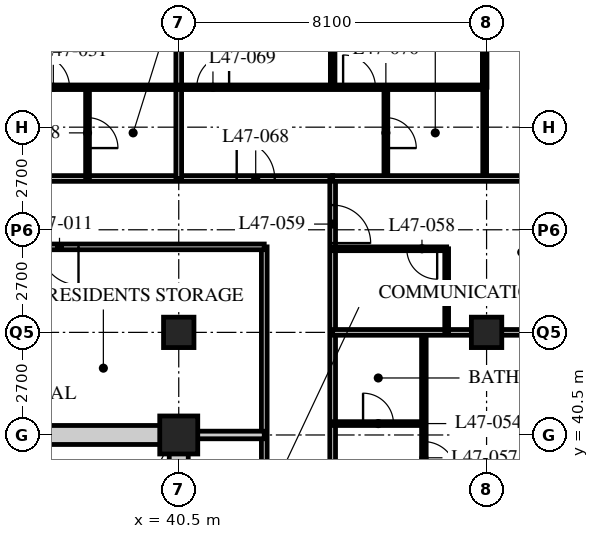
"""IFC4 building model, lengths in metres.
Left out: names, types, materials, properties, quantities, classifications, styles, units other than length and angle.
Written with IfcOpenShell. Run it as: python <this file> out.ifc"""

import sys

from ifc_helpers import new_model, si_unit, direction, frame, frame_2d, origin, origin_2d, place, context, subcontext, project, spatial, rectangle, hollow_rectangle, extrude, element, fill, save


model = new_model("IFC4")
c1 = context("Model", 3, precision=1e-05, world=origin(), true_north=direction((0.0, 1.0)))
c2 = subcontext(c1, "Body", "Model", "MODEL_VIEW")
j1 = project(units=[si_unit("LENGTHUNIT", "METRE"), si_unit("PLANEANGLEUNIT", "RADIAN")], contexts=[c1])
p1 = place(None, origin())
s1 = spatial("IfcSite", under=j1, at=p1, CompositionType="ELEMENT")
p2 = place(p1, origin())
s2 = spatial("IfcBuilding", under=s1, at=p2, CompositionType="ELEMENT")
p3 = place(p2, frame((0.0, 0.0, 184.8)))
s3 = spatial("IfcBuildingStorey", under=s2, at=p3, CompositionType="ELEMENT", Elevation=184.8)
p4 = place(p3, frame((40.5, 40.5, 0.0), z_axis=(0.0, 0.0, 1.0), x_axis=(1.0, 0.0, 0.0)))
e1 = element("IfcColumn", 1, at=p4, inside=s3, PredefinedType="COLUMN", context=c2, shape_type="SweptSolid", body=[
    extrude(hollow_rectangle(XDim=1.0, YDim=1.0, WallThickness=0.1, at=origin_2d()), origin(), (0.0, 0.0, 1.0), 3.6),
])
for number, where, z_axis, x_axis in (
    (2, (40.5, 43.2, 0.0), (0.0, 0.0, 1.0), (1.0, 0.0, 0.0)),
    (3, (48.6, 43.2, 0.0), (0.0, 0.0, 1.0), (1.0, 0.0, 0.0)),
):
    element("IfcColumn", number, at=place(p3, frame(where, z_axis=z_axis, x_axis=x_axis)), inside=s3, PredefinedType="COLUMN", context=c2, shape_type="SweptSolid", body=[
        extrude(hollow_rectangle(XDim=0.8, YDim=0.8, WallThickness=0.08, at=origin_2d()), origin(), (0.0, 0.0, 1.0), 3.6),
    ])
p5 = place(p3, frame((12.15, 47.25, 0.0), z_axis=(0.0, 0.0, 1.0), x_axis=(1.0, 0.0, 0.0)))
e4 = element("IfcWall", 4, at=p5, inside=s3, PredefinedType="PARTITIONING", context=c2, shape_type="SweptSolid", body=[
    extrude(rectangle(XDim=32.4, YDim=0.15, at=frame_2d((16.2, 0.0))), origin(), (0.0, 0.0, 1.0), 3.39),
])
p6 = place(p5, frame((4.45, 0.0, 0.0)))
e5 = element("IfcOpeningElement", 5, at=p6, cuts=e4, PredefinedType="OPENING", context=c2, shape_type="SweptSolid", body=[
    extrude(rectangle(XDim=1.0, YDim=2.1, at=frame_2d((0.5, 1.05))), frame((0.0, 0.085, 0.0), z_axis=(0.0, -1.0, 0.0), x_axis=(1.0, 0.0, 0.0)), (0.0, 0.0, 1.0), 0.17),
])
p7 = place(p5, frame((16.6, 0.0, 0.0)))
e6 = element("IfcOpeningElement", 6, at=p7, cuts=e4, PredefinedType="OPENING", context=c2, shape_type="SweptSolid", body=[
    extrude(rectangle(XDim=1.0, YDim=2.1, at=frame_2d((0.5, 1.05))), frame((0.0, 0.085, 0.0), z_axis=(0.0, -1.0, 0.0), x_axis=(1.0, 0.0, 0.0)), (0.0, 0.0, 1.0), 0.17),
])
p8 = place(p5, frame((29.875, 0.0, 0.0)))
e7 = element("IfcOpeningElement", 7, at=p8, cuts=e4, PredefinedType="OPENING", context=c2, shape_type="SweptSolid", body=[
    extrude(rectangle(XDim=1.0, YDim=2.1, at=frame_2d((0.5, 1.05))), frame((0.0, 0.085, 0.0), z_axis=(0.0, -1.0, 0.0), x_axis=(1.0, 0.0, 0.0)), (0.0, 0.0, 1.0), 0.17),
])
p9 = place(p5, frame((1.525, 0.0, 0.0)))
e8 = element("IfcOpeningElement", 8, at=p9, cuts=e4, PredefinedType="OPENING", context=c2, shape_type="SweptSolid", body=[
    extrude(rectangle(XDim=1.0, YDim=2.1, at=frame_2d((0.5, 1.05))), frame((0.0, 0.085, 0.0), z_axis=(0.0, -1.0, 0.0), x_axis=(1.0, 0.0, 0.0)), (0.0, 0.0, 1.0), 0.17),
])
p10 = place(p3, frame((44.55, 18.9, 0.0), z_axis=(0.0, 0.0, 1.0), x_axis=(0.0, 1.0, 0.0)))
e9 = element("IfcWall", 9, at=p10, inside=s3, PredefinedType="PARTITIONING", context=c2, shape_type="SweptSolid", body=[
    extrude(rectangle(XDim=28.35, YDim=0.15, at=frame_2d((14.175, 0.0))), origin(), (0.0, 0.0, 1.0), 3.39),
])
p11 = place(p10, frame((0.4, 0.0, 0.0)))
e10 = element("IfcOpeningElement", 10, at=p11, cuts=e9, PredefinedType="OPENING", context=c2, shape_type="SweptSolid", body=[
    extrude(rectangle(XDim=1.0, YDim=2.1, at=frame_2d((0.5, 1.05))), frame((0.0, 0.085, 0.0), z_axis=(0.0, -1.0, 0.0), x_axis=(1.0, 0.0, 0.0)), (0.0, 0.0, 1.0), 0.17),
])
p12 = place(p10, frame((10.45, 0.0, 0.0)))
e11 = element("IfcOpeningElement", 11, at=p12, cuts=e9, PredefinedType="OPENING", context=c2, shape_type="SweptSolid", body=[
    extrude(rectangle(XDim=1.0, YDim=2.1, at=frame_2d((0.5, 1.05))), frame((0.0, 0.085, 0.0), z_axis=(0.0, -1.0, 0.0), x_axis=(1.0, 0.0, 0.0)), (0.0, 0.0, 1.0), 0.17),
])
p13 = place(p10, frame((14.5, 0.0, 0.0)))
e12 = element("IfcOpeningElement", 12, at=p13, cuts=e9, PredefinedType="OPENING", context=c2, shape_type="SweptSolid", body=[
    extrude(rectangle(XDim=1.0, YDim=2.1, at=frame_2d((0.5, 1.05))), frame((0.0, 0.085, 0.0), z_axis=(0.0, -1.0, 0.0), x_axis=(1.0, 0.0, 0.0)), (0.0, 0.0, 1.0), 0.17),
])
p14 = place(p10, frame((16.6, 0.0, 0.0)))
e13 = element("IfcOpeningElement", 13, at=p14, cuts=e9, PredefinedType="OPENING", context=c2, shape_type="SweptSolid", body=[
    extrude(rectangle(XDim=1.0, YDim=2.1, at=frame_2d((0.5, 1.05))), frame((0.0, 0.085, 0.0), z_axis=(0.0, -1.0, 0.0), x_axis=(1.0, 0.0, 0.0)), (0.0, 0.0, 1.0), 0.17),
])
p15 = place(p10, frame((26.65, 0.0, 0.0)))
e14 = element("IfcOpeningElement", 14, at=p15, cuts=e9, PredefinedType="OPENING", context=c2, shape_type="SweptSolid", body=[
    extrude(rectangle(XDim=1.0, YDim=2.1, at=frame_2d((0.5, 1.05))), frame((0.0, 0.085, 0.0), z_axis=(0.0, -1.0, 0.0), x_axis=(1.0, 0.0, 0.0)), (0.0, 0.0, 1.0), 0.17),
])
p16 = place(p3, frame((42.75, 20.7, 0.0), z_axis=(0.0, 0.0, 1.0), x_axis=(0.0, 1.0, 0.0)))
e15 = element("IfcWall", 15, at=p16, inside=s3, PredefinedType="PARTITIONING", context=c2, shape_type="SweptSolid", body=[
    extrude(rectangle(XDim=24.75, YDim=0.15, at=frame_2d((12.375, 0.0))), origin(), (0.0, 0.0, 1.0), 3.39),
])
p17 = place(p16, frame((7.15, 0.0, 0.0)))
e16 = element("IfcOpeningElement", 16, at=p17, cuts=e15, PredefinedType="OPENING", context=c2, shape_type="SweptSolid", body=[
    extrude(rectangle(XDim=1.0, YDim=2.1, at=frame_2d((0.5, 1.05))), frame((0.0, 0.085, 0.0), z_axis=(0.0, -1.0, 0.0), x_axis=(1.0, 0.0, 0.0)), (0.0, 0.0, 1.0), 0.17),
])
p18 = place(p16, frame((15.25, 0.0, 0.0)))
e17 = element("IfcOpeningElement", 17, at=p18, cuts=e15, PredefinedType="OPENING", context=c2, shape_type="SweptSolid", body=[
    extrude(rectangle(XDim=1.0, YDim=2.1, at=frame_2d((0.5, 1.05))), frame((0.0, 0.085, 0.0), z_axis=(0.0, -1.0, 0.0), x_axis=(1.0, 0.0, 0.0)), (0.0, 0.0, 1.0), 0.17),
])
p19 = place(p3, frame((42.75, 45.45, 0.0), z_axis=(0.0, 0.0, 1.0), x_axis=(-1.0, 0.0, 0.0)))
e18 = element("IfcWall", 18, at=p19, inside=s3, PredefinedType="PARTITIONING", context=c2, shape_type="SweptSolid", body=[
    extrude(rectangle(XDim=13.19, YDim=0.15, at=frame_2d((6.595, 0.0))), origin(), (0.0, 0.0, 1.0), 3.39),
])
p20 = place(p19, frame((11.488, 0.0, 0.0)))
e19 = element("IfcOpeningElement", 19, at=p20, cuts=e18, PredefinedType="OPENING", context=c2, shape_type="SweptSolid", body=[
    extrude(rectangle(XDim=1.0, YDim=2.1, at=frame_2d((0.5, 1.05))), frame((0.0, 0.085, 0.0), z_axis=(0.0, -1.0, 0.0), x_axis=(1.0, 0.0, 0.0)), (0.0, 0.0, 1.0), 0.17),
])
p21 = place(p19, frame((4.888, 0.0, 0.0)))
e20 = element("IfcOpeningElement", 20, at=p21, cuts=e18, PredefinedType="OPENING", context=c2, shape_type="SweptSolid", body=[
    extrude(rectangle(XDim=1.0, YDim=2.1, at=frame_2d((0.5, 1.05))), frame((0.0, 0.085, 0.0), z_axis=(0.0, -1.0, 0.0), x_axis=(1.0, 0.0, 0.0)), (0.0, 0.0, 1.0), 0.17),
])
p22 = place(p3, frame((40.5, 40.5, 0.0), z_axis=(0.0, 0.0, 1.0), x_axis=(1.0, 0.0, 0.0)))
e21 = element("IfcWall", 21, at=p22, inside=s3, PredefinedType="SOLIDWALL", context=c2, shape_type="SweptSolid", body=[
    extrude(rectangle(XDim=2.25, YDim=0.2, at=frame_2d((1.125, 0.0))), origin(), (0.0, 0.0, 1.0), 3.39),
])
p23 = place(p3, frame((38.1, 47.25, 0.0), z_axis=(0.0, 0.0, 1.0), x_axis=(0.0, 1.0, 0.0)))
e22 = element("IfcWall", 22, at=p23, inside=s3, PredefinedType="PARTITIONING", context=c2, shape_type="SweptSolid", body=[
    extrude(rectangle(XDim=2.4, YDim=0.1, at=frame_2d((1.2, 0.0))), origin(), (0.0, 0.0, 1.0), 3.39),
])
p24 = place(p23, frame((0.8, 0.0, 0.0)))
e23 = element("IfcOpeningElement", 23, at=p24, cuts=e22, PredefinedType="OPENING", context=c2, shape_type="SweptSolid", body=[
    extrude(rectangle(XDim=0.8, YDim=2.1, at=frame_2d((0.4, 1.05))), frame((0.0, 0.06, 0.0), z_axis=(0.0, -1.0, 0.0), x_axis=(1.0, 0.0, 0.0)), (0.0, 0.0, 1.0), 0.12),
])
p25 = place(p3, frame((46.95, 35.1, 0.0), z_axis=(0.0, 0.0, 1.0), x_axis=(0.0, 1.0, 0.0)))
e24 = element("IfcWall", 24, at=p25, inside=s3, PredefinedType="PARTITIONING", context=c2, shape_type="SweptSolid", body=[
    extrude(rectangle(XDim=8.1, YDim=0.12, at=frame_2d((4.05, 0.0))), origin(), (0.0, 0.0, 1.0), 3.39),
])
p26 = place(p25, frame((0.975, 0.0, 0.0)))
e25 = element("IfcOpeningElement", 25, at=p26, cuts=e24, PredefinedType="OPENING", context=c2, shape_type="SweptSolid", body=[
    extrude(rectangle(XDim=0.85, YDim=2.1, at=frame_2d((0.425, 1.05))), frame((0.0, 0.07, 0.0), z_axis=(0.0, -1.0, 0.0), x_axis=(1.0, 0.0, 0.0)), (0.0, 0.0, 1.0), 0.14),
])
p27 = place(p25, frame((4.375, 0.0, 0.0)))
e26 = element("IfcOpeningElement", 26, at=p27, cuts=e24, PredefinedType="OPENING", context=c2, shape_type="SweptSolid", body=[
    extrude(rectangle(XDim=0.85, YDim=2.1, at=frame_2d((0.425, 1.05))), frame((0.0, 0.07, 0.0), z_axis=(0.0, -1.0, 0.0), x_axis=(1.0, 0.0, 0.0)), (0.0, 0.0, 1.0), 0.14),
])
p28 = place(p3, frame((44.55, 40.8, 0.0), z_axis=(0.0, 0.0, 1.0), x_axis=(1.0, 0.0, 0.0)))
e27 = element("IfcWall", 27, at=p28, inside=s3, PredefinedType="PARTITIONING", context=c2, shape_type="SweptSolid", body=[
    extrude(rectangle(XDim=2.4, YDim=0.1, at=frame_2d((1.2, 0.0))), origin(), (0.0, 0.0, 1.0), 3.39),
])
p29 = place(p28, frame((0.8, 0.0, 0.0)))
e28 = element("IfcOpeningElement", 28, at=p29, cuts=e27, PredefinedType="OPENING", context=c2, shape_type="SweptSolid", body=[
    extrude(rectangle(XDim=0.8, YDim=2.1, at=frame_2d((0.4, 1.05))), frame((0.0, 0.06, 0.0), z_axis=(0.0, -1.0, 0.0), x_axis=(1.0, 0.0, 0.0)), (0.0, 0.0, 1.0), 0.12),
])
p30 = place(p3, frame((44.55, 43.2, 0.0), z_axis=(0.0, 0.0, 1.0), x_axis=(1.0, 0.0, 0.0)))
e29 = element("IfcWall", 29, at=p30, inside=s3, PredefinedType="PARTITIONING", context=c2, shape_type="SweptSolid", body=[
    extrude(rectangle(XDim=11.85, YDim=0.15, at=frame_2d((5.925, 0.0))), origin(), (0.0, 0.0, 1.0), 2.778),
])
p31 = place(p3, frame((47.55, 43.2, 0.0), z_axis=(0.0, 0.0, 1.0), x_axis=(0.0, 1.0, 0.0)))
e30 = element("IfcWall", 30, at=p31, inside=s3, PredefinedType="PARTITIONING", context=c2, shape_type="SweptSolid", body=[
    extrude(rectangle(XDim=2.2, YDim=0.1, at=frame_2d((1.1, 0.0))), origin(), (0.0, 0.0, 1.0), 3.39),
])
p32 = place(p3, frame((44.55, 45.4, 0.0), z_axis=(0.0, 0.0, 1.0), x_axis=(1.0, 0.0, 0.0)))
e31 = element("IfcWall", 31, at=p32, inside=s3, PredefinedType="PARTITIONING", context=c2, shape_type="SweptSolid", body=[
    extrude(rectangle(XDim=3.0, YDim=0.1, at=frame_2d((1.5, 0.0))), origin(), (0.0, 0.0, 1.0), 3.39),
])
p33 = place(p32, frame((1.95, 0.0, 0.0)))
e32 = element("IfcOpeningElement", 32, at=p33, cuts=e31, PredefinedType="OPENING", context=c2, shape_type="SweptSolid", body=[
    extrude(rectangle(XDim=0.8, YDim=2.1, at=frame_2d((0.4, 1.05))), frame((0.0, 0.06, 0.0), z_axis=(0.0, -1.0, 0.0), x_axis=(1.0, 0.0, 0.0)), (0.0, 0.0, 1.0), 0.12),
])
p34 = place(p3, frame((45.95, 47.25, 0.0), z_axis=(0.0, 0.0, 1.0), x_axis=(0.0, 1.0, 0.0)))
e33 = element("IfcWall", 33, at=p34, inside=s3, PredefinedType="PARTITIONING", context=c2, shape_type="SweptSolid", body=[
    extrude(rectangle(XDim=2.4, YDim=0.1, at=frame_2d((1.2, 0.0))), origin(), (0.0, 0.0, 1.0), 3.39),
])
p35 = place(p34, frame((0.8, 0.0, 0.0)))
e34 = element("IfcOpeningElement", 34, at=p35, cuts=e33, PredefinedType="OPENING", context=c2, shape_type="SweptSolid", body=[
    extrude(rectangle(XDim=0.8, YDim=2.1, at=frame_2d((0.4, 1.05))), frame((0.0, 0.06, 0.0), z_axis=(0.0, -1.0, 0.0), x_axis=(1.0, 0.0, 0.0)), (0.0, 0.0, 1.0), 0.12),
])
p36 = place(p3, frame((48.55, 47.25, 0.0), z_axis=(0.0, 0.0, 1.0), x_axis=(0.0, 1.0, 0.0)))
e35 = element("IfcWall", 35, at=p36, inside=s3, PredefinedType="PARTITIONING", context=c2, shape_type="SweptSolid", body=[
    extrude(rectangle(XDim=2.4, YDim=0.1, at=frame_2d((1.2, 0.0))), origin(), (0.0, 0.0, 1.0), 2.778),
])
p37 = place(p3, frame((44.55, 49.65, 0.0), z_axis=(0.0, 0.0, 1.0), x_axis=(0.0, 1.0, 0.0)))
e36 = element("IfcWall", 36, at=p37, inside=s3, PredefinedType="PARTITIONING", context=c2, shape_type="SweptSolid", body=[
    extrude(rectangle(XDim=9.45, YDim=0.12, at=frame_2d((4.725, 0.0))), origin(), (0.0, 0.0, 1.0), 3.39),
])
p38 = place(p3, frame((44.55, 47.25, 0.0), z_axis=(0.0, 0.0, 1.0), x_axis=(1.0, 0.0, 0.0)))
e37 = element("IfcWall", 37, at=p38, inside=s3, PredefinedType="PARTITIONING", context=c2, shape_type="SweptSolid", body=[
    extrude(rectangle(XDim=11.85, YDim=0.15, at=frame_2d((5.925, 0.0))), origin(), (0.0, 0.0, 1.0), 3.39),
])
p39 = place(p3, frame((40.5, 47.25, 0.0), z_axis=(0.0, 0.0, 1.0), x_axis=(0.0, 1.0, 0.0)))
e38 = element("IfcWall", 38, at=p39, inside=s3, PredefinedType="PARTITIONING", context=c2, shape_type="SweptSolid", body=[
    extrude(rectangle(XDim=11.85, YDim=0.15, at=frame_2d((5.925, 0.0))), origin(), (0.0, 0.0, 1.0), 2.778),
])
p40 = place(p3, frame((8.15, 49.65, 0.0), z_axis=(0.0, 0.0, 1.0), x_axis=(1.0, 0.0, 0.0)))
e39 = element("IfcWall", 39, at=p40, inside=s3, PredefinedType="PARTITIONING", context=c2, shape_type="SweptSolid", body=[
    extrude(rectangle(XDim=40.4, YDim=0.12, at=frame_2d((20.2, 0.0))), origin(), (0.0, 0.0, 1.0), 3.39),
])
p41 = place(p40, frame((9.025, 0.0, 0.0)))
e40 = element("IfcOpeningElement", 40, at=p41, cuts=e39, PredefinedType="OPENING", context=c2, shape_type="SweptSolid", body=[
    extrude(rectangle(XDim=0.85, YDim=2.1, at=frame_2d((0.425, 1.05))), frame((0.0, 0.07, 0.0), z_axis=(0.0, -1.0, 0.0), x_axis=(1.0, 0.0, 0.0)), (0.0, 0.0, 1.0), 0.14),
])
p42 = place(p40, frame((16.475, 0.0, 0.0)))
e41 = element("IfcOpeningElement", 41, at=p42, cuts=e39, PredefinedType="OPENING", context=c2, shape_type="SweptSolid", body=[
    extrude(rectangle(XDim=0.85, YDim=2.1, at=frame_2d((0.425, 1.05))), frame((0.0, 0.07, 0.0), z_axis=(0.0, -1.0, 0.0), x_axis=(1.0, 0.0, 0.0)), (0.0, 0.0, 1.0), 0.14),
])
p43 = place(p40, frame((21.175, 0.0, 0.0)))
e42 = element("IfcOpeningElement", 42, at=p43, cuts=e39, PredefinedType="OPENING", context=c2, shape_type="SweptSolid", body=[
    extrude(rectangle(XDim=0.85, YDim=2.1, at=frame_2d((0.425, 1.05))), frame((0.0, 0.07, 0.0), z_axis=(0.0, -1.0, 0.0), x_axis=(1.0, 0.0, 0.0)), (0.0, 0.0, 1.0), 0.14),
])
p44 = place(p40, frame((28.625, 0.0, 0.0)))
e43 = element("IfcOpeningElement", 43, at=p44, cuts=e39, PredefinedType="OPENING", context=c2, shape_type="SweptSolid", body=[
    extrude(rectangle(XDim=0.85, YDim=2.1, at=frame_2d((0.425, 1.05))), frame((0.0, 0.07, 0.0), z_axis=(0.0, -1.0, 0.0), x_axis=(1.0, 0.0, 0.0)), (0.0, 0.0, 1.0), 0.14),
])
p45 = place(p40, frame((32.825, 0.0, 0.0)))
e44 = element("IfcOpeningElement", 44, at=p45, cuts=e39, PredefinedType="OPENING", context=c2, shape_type="SweptSolid", body=[
    extrude(rectangle(XDim=0.85, YDim=2.1, at=frame_2d((0.425, 1.05))), frame((0.0, 0.07, 0.0), z_axis=(0.0, -1.0, 0.0), x_axis=(1.0, 0.0, 0.0)), (0.0, 0.0, 1.0), 0.14),
])
p46 = place(p40, frame((36.675, 0.0, 0.0)))
e45 = element("IfcOpeningElement", 45, at=p46, cuts=e39, PredefinedType="OPENING", context=c2, shape_type="SweptSolid", body=[
    extrude(rectangle(XDim=0.85, YDim=2.1, at=frame_2d((0.425, 1.05))), frame((0.0, 0.07, 0.0), z_axis=(0.0, -1.0, 0.0), x_axis=(1.0, 0.0, 0.0)), (0.0, 0.0, 1.0), 0.14),
])
p47 = place(p40, frame((6.725, 0.0, 0.0)))
e46 = element("IfcOpeningElement", 46, at=p47, cuts=e39, PredefinedType="OPENING", context=c2, shape_type="SweptSolid", body=[
    extrude(rectangle(XDim=0.85, YDim=2.1, at=frame_2d((0.425, 1.05))), frame((0.0, 0.07, 0.0), z_axis=(0.0, -1.0, 0.0), x_axis=(1.0, 0.0, 0.0)), (0.0, 0.0, 1.0), 0.14),
])
p48 = place(p40, frame((2.875, 0.0, 0.0)))
e47 = element("IfcOpeningElement", 47, at=p48, cuts=e39, PredefinedType="OPENING", context=c2, shape_type="SweptSolid", body=[
    extrude(rectangle(XDim=0.85, YDim=2.1, at=frame_2d((0.425, 1.05))), frame((0.0, 0.07, 0.0), z_axis=(0.0, -1.0, 0.0), x_axis=(1.0, 0.0, 0.0)), (0.0, 0.0, 1.0), 0.14),
])
p49 = place(p3, frame((48.55, 49.65, 0.0), z_axis=(0.0, 0.0, 1.0), x_axis=(0.0, 1.0, 0.0)))
e48 = element("IfcWall", 48, at=p49, inside=s3, PredefinedType="PARTITIONING", context=c2, shape_type="SweptSolid", body=[
    extrude(rectangle(XDim=1.25, YDim=0.12, at=frame_2d((0.625, 0.0))), origin(), (0.0, 0.0, 1.0), 2.778),
])
p50 = place(p3, frame((15.95, 40.5, 0.0), z_axis=(0.0, 0.0, 1.0), x_axis=(1.0, 0.0, 0.0)))
e49 = element("IfcWall", 49, at=p50, inside=s3, PredefinedType="SOLIDWALL", context=c2, shape_type="SweptSolid", body=[
    extrude(rectangle(XDim=24.8, YDim=0.5, at=frame_2d((12.4, 0.0))), origin(), (0.0, 0.0, 1.0), 2.74),
])
p51 = place(p50, frame((11.5, 0.0, 0.0)))
e50 = element("IfcOpeningElement", 50, at=p51, cuts=e49, PredefinedType="OPENING", context=c2, shape_type="SweptSolid", body=[
    extrude(rectangle(XDim=1.8, YDim=2.4, at=frame_2d((0.9, 1.2))), frame((0.0, 0.26, 0.0), z_axis=(0.0, -1.0, 0.0), x_axis=(1.0, 0.0, 0.0)), (0.0, 0.0, 1.0), 0.52),
])
p52 = place(p3, frame((40.5, 24.55, 0.0), z_axis=(0.0, 0.0, 1.0), x_axis=(0.0, 1.0, 0.0)))
e51 = element("IfcWall", 51, at=p52, inside=s3, PredefinedType="SOLIDWALL", context=c2, shape_type="SweptSolid", body=[
    extrude(rectangle(XDim=15.7, YDim=0.5, at=frame_2d((7.85, 0.0))), origin(), (0.0, 0.0, 1.0), 2.778),
])
p53 = place(p21, origin())
e52 = element("IfcDoor", 52, at=p53, inside=s3, OperationType="SINGLE_SWING_LEFT", PredefinedType="DOOR", context=c2, shape_type="SweptSolid", body=[
    extrude(rectangle(XDim=1.0, YDim=2.1, at=frame_2d((0.5, 1.05))), frame((0.0, 0.025, 0.0), z_axis=(0.0, -1.0, 0.0), x_axis=(1.0, 0.0, 0.0)), (0.0, 0.0, 1.0), 0.05),
])
fill(e20, e52)
p54 = place(p24, origin())
e53 = element("IfcDoor", 53, at=p54, inside=s3, OperationType="SINGLE_SWING_RIGHT", PredefinedType="DOOR", context=c2, shape_type="SweptSolid", body=[
    extrude(rectangle(XDim=0.8, YDim=2.1, at=frame_2d((0.4, 1.05))), frame((0.0, 0.025, 0.0), z_axis=(0.0, -1.0, 0.0), x_axis=(1.0, 0.0, 0.0)), (0.0, 0.0, 1.0), 0.05),
])
fill(e23, e53)
p55 = place(p44, origin())
e54 = element("IfcDoor", 54, at=p55, inside=s3, OperationType="SINGLE_SWING_LEFT", PredefinedType="DOOR", context=c2, shape_type="SweptSolid", body=[
    extrude(rectangle(XDim=0.85, YDim=2.1, at=frame_2d((0.425, 1.05))), frame((0.0, 0.025, 0.0), z_axis=(0.0, -1.0, 0.0), x_axis=(1.0, 0.0, 0.0)), (0.0, 0.0, 1.0), 0.05),
])
fill(e43, e54)
p56 = place(p29, origin())
e55 = element("IfcDoor", 55, at=p56, inside=s3, OperationType="SINGLE_SWING_LEFT", PredefinedType="DOOR", context=c2, shape_type="SweptSolid", body=[
    extrude(rectangle(XDim=0.8, YDim=2.1, at=frame_2d((0.4, 1.05))), frame((0.0, 0.025, 0.0), z_axis=(0.0, -1.0, 0.0), x_axis=(1.0, 0.0, 0.0)), (0.0, 0.0, 1.0), 0.05),
])
fill(e28, e55)
p57 = place(p27, origin())
e56 = element("IfcDoor", 56, at=p57, inside=s3, OperationType="SINGLE_SWING_RIGHT", PredefinedType="DOOR", context=c2, shape_type="SweptSolid", body=[
    extrude(rectangle(XDim=0.85, YDim=2.1, at=frame_2d((0.425, 1.05))), frame((0.0, 0.025, 0.0), z_axis=(0.0, -1.0, 0.0), x_axis=(1.0, 0.0, 0.0)), (0.0, 0.0, 1.0), 0.05),
])
fill(e26, e56)
p58 = place(p33, origin())
e57 = element("IfcDoor", 57, at=p58, inside=s3, OperationType="SINGLE_SWING_LEFT", PredefinedType="DOOR", context=c2, shape_type="SweptSolid", body=[
    extrude(rectangle(XDim=0.8, YDim=2.1, at=frame_2d((0.4, 1.05))), frame((0.0, 0.025, 0.0), z_axis=(0.0, -1.0, 0.0), x_axis=(1.0, 0.0, 0.0)), (0.0, 0.0, 1.0), 0.05),
])
fill(e32, e57)
p59 = place(p15, origin())
e58 = element("IfcDoor", 58, at=p59, inside=s3, OperationType="SINGLE_SWING_RIGHT", PredefinedType="DOOR", context=c2, shape_type="SweptSolid", body=[
    extrude(rectangle(XDim=1.0, YDim=2.1, at=frame_2d((0.5, 1.05))), frame((0.0, 0.025, 0.0), z_axis=(0.0, -1.0, 0.0), x_axis=(1.0, 0.0, 0.0)), (0.0, 0.0, 1.0), 0.05),
])
fill(e14, e58)
p60 = place(p8, origin())
e59 = element("IfcDoor", 59, at=p60, inside=s3, OperationType="SINGLE_SWING_LEFT", PredefinedType="DOOR", context=c2, shape_type="SweptSolid", body=[
    extrude(rectangle(XDim=1.0, YDim=2.1, at=frame_2d((0.5, 1.05))), frame((0.0, 0.025, 0.0), z_axis=(0.0, -1.0, 0.0), x_axis=(1.0, 0.0, 0.0)), (0.0, 0.0, 1.0), 0.05),
])
fill(e7, e59)
p61 = place(p45, origin())
e60 = element("IfcDoor", 60, at=p61, inside=s3, OperationType="SINGLE_SWING_RIGHT", PredefinedType="DOOR", context=c2, shape_type="SweptSolid", body=[
    extrude(rectangle(XDim=0.85, YDim=2.1, at=frame_2d((0.425, 1.05))), frame((0.0, 0.025, 0.0), z_axis=(0.0, -1.0, 0.0), x_axis=(1.0, 0.0, 0.0)), (0.0, 0.0, 1.0), 0.05),
])
fill(e44, e60)
p62 = place(p35, origin())
e61 = element("IfcDoor", 61, at=p62, inside=s3, OperationType="SINGLE_SWING_RIGHT", PredefinedType="DOOR", context=c2, shape_type="SweptSolid", body=[
    extrude(rectangle(XDim=0.8, YDim=2.1, at=frame_2d((0.4, 1.05))), frame((0.0, 0.025, 0.0), z_axis=(0.0, -1.0, 0.0), x_axis=(1.0, 0.0, 0.0)), (0.0, 0.0, 1.0), 0.05),
])
fill(e34, e61)
p63 = place(p46, origin())
e62 = element("IfcDoor", 62, at=p63, inside=s3, OperationType="SINGLE_SWING_LEFT", PredefinedType="DOOR", context=c2, shape_type="SweptSolid", body=[
    extrude(rectangle(XDim=0.85, YDim=2.1, at=frame_2d((0.425, 1.05))), frame((0.0, 0.025, 0.0), z_axis=(0.0, -1.0, 0.0), x_axis=(1.0, 0.0, 0.0)), (0.0, 0.0, 1.0), 0.05),
])
fill(e45, e62)
save(model, sys.argv[1])
